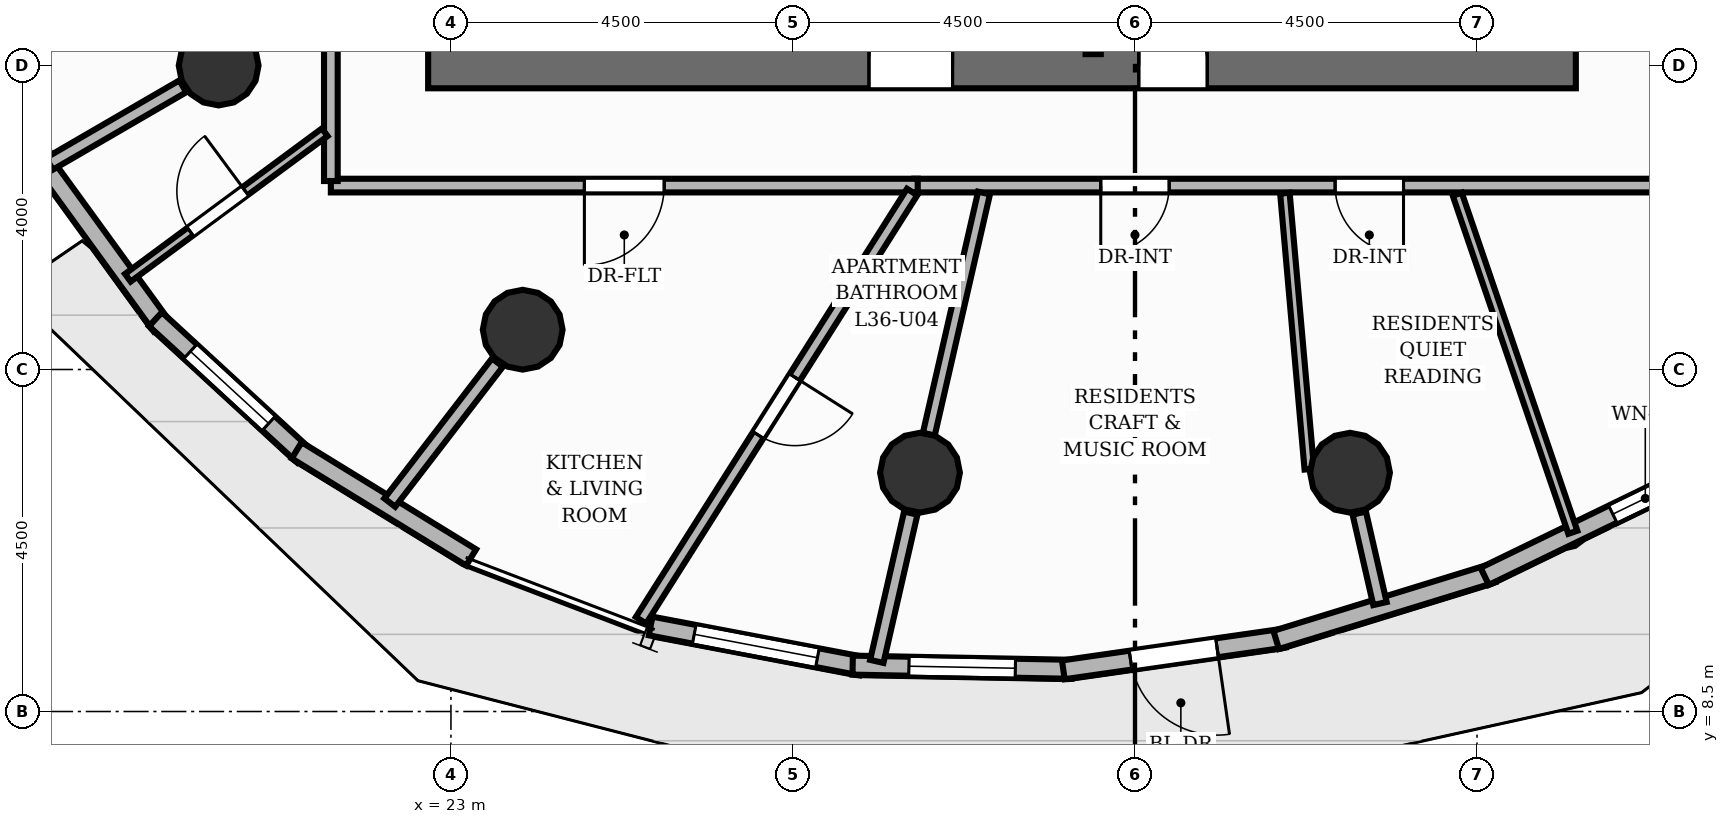
"""IFC4 building model, lengths in metres.
Left out: names, types, materials, properties, quantities, classifications, styles, units other than length and angle.
Written with IfcOpenShell. Run it as: python <this file> out.ifc"""

import sys

from ifc_helpers import new_model, si_unit, direction, frame, frame_2d, origin, origin_2d, place, context, subcontext, project, spatial, rectangle, circle, extrude, element, fill, save


model = new_model("IFC4")
c1 = context("Model", 3, precision=1e-05, world=origin(), true_north=direction((0.0, 1.0)))
c2 = subcontext(c1, "Body", "Model", "MODEL_VIEW")
j1 = project(units=[si_unit("LENGTHUNIT", "METRE"), si_unit("PLANEANGLEUNIT", "RADIAN")], contexts=[c1])
p1 = place(None, origin())
s1 = spatial("IfcSite", under=j1, at=p1, CompositionType="ELEMENT")
p2 = place(p1, origin())
s2 = spatial("IfcBuilding", under=s1, at=p2, CompositionType="ELEMENT")
p3 = place(p2, frame((0.0, 0.0, 123.36)))
s3 = spatial("IfcBuildingStorey", under=s2, at=p3, CompositionType="ELEMENT", Elevation=123.36)
p4 = place(p3, frame((22.7, 17.0, 0.0), z_axis=(0.0, 0.0, 1.0), x_axis=(1.0, 0.0, 0.0)))
e1 = element("IfcWall", 1, at=p4, inside=s3, PredefinedType="SHEAR", context=c2, shape_type="SweptSolid", body=[
    extrude(rectangle(XDim=15.1, YDim=0.6, at=frame_2d((7.55, 0.0))), origin(), (0.0, 0.0, 1.0), 3.2),
])
p5 = place(p4, frame((5.8, 0.0, 0.0)))
e2 = element("IfcOpeningElement", 2, at=p5, cuts=e1, PredefinedType="OPENING", context=c2, shape_type="SweptSolid", body=[
    extrude(rectangle(XDim=1.1, YDim=2.15, at=frame_2d((0.55, 1.075))), frame((0.0, 0.31, 0.0), z_axis=(0.0, -1.0, 0.0), x_axis=(1.0, 0.0, 0.0)), (0.0, 0.0, 1.0), 0.62),
])
p6 = place(p4, frame((9.35, 0.0, 0.0)))
e3 = element("IfcOpeningElement", 3, at=p6, cuts=e1, PredefinedType="OPENING", context=c2, shape_type="SweptSolid", body=[
    extrude(rectangle(XDim=0.9, YDim=2.1, at=frame_2d((0.45, 1.05))), frame((0.0, 0.31, 0.0), z_axis=(0.0, -1.0, 0.0), x_axis=(1.0, 0.0, 0.0)), (0.0, 0.0, 1.0), 0.62),
])
for number, where, z_axis, x_axis in (
    (4, (19.944, 17.0, 0.0), (0.0, 0.0, 1.0), (1.0, 0.0, 0.0)),
    (5, (23.944, 13.523, 0.0), (0.0, 0.0, 1.0), (1.0, 0.0, 0.0)),
    (6, (29.171, 11.642, 0.0), (0.0, 0.0, 1.0), (1.0, 0.0, 0.0)),
    (7, (34.829, 11.642, 0.0), (0.0, 0.0, 1.0), (1.0, 0.0, 0.0)),
):
    element("IfcColumn", number, at=place(p3, frame(where, z_axis=z_axis, x_axis=x_axis)), inside=s3, PredefinedType="COLUMN", context=c2, shape_type="SweptSolid", body=[
        extrude(circle(Radius=0.525, at=origin_2d()), origin(), (0.0, 0.0, 1.0), 3.2),
    ])
p7 = place(p3, frame((17.705, 15.6, 0.0), z_axis=(0.0, 0.0, 1.0), x_axis=(-0.41458087789, 0.910012470073, 0.0)))
e8 = element("IfcWall", 8, at=p7, inside=s3, PredefinedType="SOLIDWALL", context=c2, shape_type="SweptSolid", body=[
    extrude(rectangle(XDim=2.624, YDim=0.25, at=frame_2d((1.312, 0.0))), origin(), (0.0, 0.0, 1.0), 2.96),
])
p8 = place(p7, frame((0.612, 0.0, 0.85)))
e9 = element("IfcOpeningElement", 9, at=p8, cuts=e8, PredefinedType="OPENING", context=c2, shape_type="SweptSolid", body=[
    extrude(rectangle(XDim=1.4, YDim=1.55, at=frame_2d((0.7, 0.775))), frame((0.0, 0.135, 0.0), z_axis=(0.0, -1.0, 0.0), x_axis=(1.0, 0.0, 0.0)), (0.0, 0.0, 1.0), 0.27),
])
p9 = place(p3, frame((19.189, 13.576, 0.0), z_axis=(0.0, 0.0, 1.0), x_axis=(-0.587574137145, 0.80917033643, 0.0)))
e10 = element("IfcWall", 10, at=p9, inside=s3, PredefinedType="SOLIDWALL", context=c2, shape_type="SweptSolid", body=[
    extrude(rectangle(XDim=2.624, YDim=0.25, at=frame_2d((1.312, 0.0))), origin(), (0.0, 0.0, 1.0), 2.96),
])
p10 = place(p3, frame((21.061, 11.868, 0.0), z_axis=(0.0, 0.0, 1.0), x_axis=(-0.73572884951, 0.677276206579, 0.0)))
e11 = element("IfcWall", 11, at=p10, inside=s3, PredefinedType="SOLIDWALL", context=c2, shape_type="SweptSolid", body=[
    extrude(rectangle(XDim=2.648, YDim=0.25, at=frame_2d((1.324, 0.0))), origin(), (0.0, 0.0, 1.0), 2.96),
])
p11 = place(p10, frame((0.624, 0.0, 0.85)))
e12 = element("IfcOpeningElement", 12, at=p11, cuts=e11, PredefinedType="OPENING", context=c2, shape_type="SweptSolid", body=[
    extrude(rectangle(XDim=1.4, YDim=1.55, at=frame_2d((0.7, 0.775))), frame((0.0, 0.135, 0.0), z_axis=(0.0, -1.0, 0.0), x_axis=(1.0, 0.0, 0.0)), (0.0, 0.0, 1.0), 0.27),
])
p12 = place(p3, frame((23.265, 10.527, 0.0), z_axis=(0.0, 0.0, 1.0), x_axis=(-0.852103133134, 0.523373910797, 0.0)))
e13 = element("IfcWall", 13, at=p12, inside=s3, PredefinedType="SOLIDWALL", context=c2, shape_type="SweptSolid", body=[
    extrude(rectangle(XDim=2.693, YDim=0.25, at=frame_2d((1.346, 0.0))), origin(), (0.0, 0.0, 1.0), 2.96),
])
p13 = place(p3, frame((28.396, 9.099, 0.0), z_axis=(0.0, 0.0, 1.0), x_axis=(-0.982412055756, 0.18672587583, 0.0)))
e14 = element("IfcWall", 14, at=p13, inside=s3, PredefinedType="SOLIDWALL", context=c2, shape_type="SweptSolid", body=[
    extrude(rectangle(XDim=2.818, YDim=0.25, at=frame_2d((1.409, 0.0))), origin(), (0.0, 0.0, 1.0), 2.96),
])
p14 = place(p13, frame((0.584, 0.0, 0.85)))
e15 = element("IfcOpeningElement", 15, at=p14, cuts=e14, PredefinedType="OPENING", context=c2, shape_type="SweptSolid", body=[
    extrude(rectangle(XDim=1.65, YDim=1.55, at=frame_2d((0.825, 0.775))), frame((0.0, 0.135, 0.0), z_axis=(0.0, -1.0, 0.0), x_axis=(1.0, 0.0, 0.0)), (0.0, 0.0, 1.0), 0.27),
])
p15 = place(p3, frame((31.167, 9.055, 0.0), z_axis=(0.0, 0.0, 1.0), x_axis=(-0.99981990109, 0.018978023714, 0.0)))
e16 = element("IfcWall", 16, at=p15, inside=s3, PredefinedType="SOLIDWALL", context=c2, shape_type="SweptSolid", body=[
    extrude(rectangle(XDim=2.882, YDim=0.25, at=frame_2d((1.441, 0.0))), origin(), (0.0, 0.0, 1.0), 2.96),
])
p16 = place(p15, frame((0.741, 0.0, 0.85)))
e17 = element("IfcOpeningElement", 17, at=p16, cuts=e16, PredefinedType="OPENING", context=c2, shape_type="SweptSolid", body=[
    extrude(rectangle(XDim=1.4, YDim=1.55, at=frame_2d((0.7, 0.775))), frame((0.0, 0.135, 0.0), z_axis=(0.0, -1.0, 0.0), x_axis=(1.0, 0.0, 0.0)), (0.0, 0.0, 1.0), 0.27),
])
p17 = place(p3, frame((33.964, 9.466, 0.0), z_axis=(0.0, 0.0, 1.0), x_axis=(-0.989856170947, -0.142073082737, 0.0)))
e18 = element("IfcWall", 18, at=p17, inside=s3, PredefinedType="SOLIDWALL", context=c2, shape_type="SweptSolid", body=[
    extrude(rectangle(XDim=2.937, YDim=0.25, at=frame_2d((1.468, 0.0))), origin(), (0.0, 0.0, 1.0), 2.96),
])
p18 = place(p17, frame((0.893, 0.0, 0.0)))
e19 = element("IfcOpeningElement", 19, at=p18, cuts=e18, PredefinedType="OPENING", context=c2, shape_type="SweptSolid", body=[
    extrude(rectangle(XDim=1.15, YDim=2.2, at=frame_2d((0.575, 1.1))), frame((0.0, 0.135, 0.0), z_axis=(0.0, -1.0, 0.0), x_axis=(1.0, 0.0, 0.0)), (0.0, 0.0, 1.0), 0.27),
])
p19 = place(p3, frame((36.702, 10.319, 0.0), z_axis=(0.0, 0.0, 1.0), x_axis=(-0.955653025963, -0.294494981227, 0.0)))
e20 = element("IfcWall", 20, at=p19, inside=s3, PredefinedType="SOLIDWALL", context=c2, shape_type="SweptSolid", body=[
    extrude(rectangle(XDim=2.977, YDim=0.25, at=frame_2d((1.489, 0.0))), origin(), (0.0, 0.0, 1.0), 2.96),
])
p20 = place(p3, frame((39.299, 11.588, 0.0), z_axis=(0.0, 0.0, 1.0), x_axis=(-0.899657133161, -0.436597117206, 0.0)))
e21 = element("IfcWall", 21, at=p20, inside=s3, PredefinedType="SOLIDWALL", context=c2, shape_type="SweptSolid", body=[
    extrude(rectangle(XDim=2.998, YDim=0.25, at=frame_2d((1.499, 0.0))), origin(), (0.0, 0.0, 1.0), 2.96),
])
p21 = place(p20, frame((0.175, 0.0, 0.85)))
e22 = element("IfcOpeningElement", 22, at=p21, cuts=e21, PredefinedType="OPENING", context=c2, shape_type="SweptSolid", body=[
    extrude(rectangle(XDim=0.95, YDim=1.45, at=frame_2d((0.475, 0.725))), frame((0.0, 0.135, 0.0), z_axis=(0.0, -1.0, 0.0), x_axis=(1.0, 0.0, 0.0)), (0.0, 0.0, 1.0), 0.27),
])
p22 = place(p3, frame((31.45, 17.15, 0.0), z_axis=(0.0, 0.0, 1.0), x_axis=(0.0, 1.0, 0.0)))
e23 = element("IfcWall", 23, at=p22, inside=s3, PredefinedType="SHEAR", context=c2, shape_type="SweptSolid", body=[
    extrude(rectangle(XDim=3.5, YDim=0.2, at=frame_2d((1.75, 0.0))), origin(), (0.0, 0.0, 1.0), 3.2),
])
p23 = place(p3, frame((19.472, 16.726, 0.0), z_axis=(0.0, 0.0, 1.0), x_axis=(-0.86481084581, -0.502097800203, 0.0)))
e24 = element("IfcWall", 24, at=p23, inside=s3, PredefinedType="PARTITIONING", context=c2, shape_type="SweptSolid", body=[
    extrude(rectangle(XDim=2.03, YDim=0.18, at=frame_2d((1.015, 0.0))), origin(), (0.0, 0.0, 1.0), 2.336),
])
p24 = place(p3, frame((23.612, 13.092, 0.0), z_axis=(0.0, 0.0, 1.0), x_axis=(-0.609553382458, -0.792745024541, 0.0)))
e25 = element("IfcWall", 25, at=p24, inside=s3, PredefinedType="PARTITIONING", context=c2, shape_type="SweptSolid", body=[
    extrude(rectangle(XDim=2.324, YDim=0.18, at=frame_2d((1.162, 0.0))), origin(), (0.0, 0.0, 1.0), 2.336),
])
p25 = place(p3, frame((29.05, 11.111, 0.0), z_axis=(0.0, 0.0, 1.0), x_axis=(-0.2231492674, -0.974784286116, 0.0)))
e26 = element("IfcWall", 26, at=p25, inside=s3, PredefinedType="PARTITIONING", context=c2, shape_type="SweptSolid", body=[
    extrude(rectangle(XDim=2.002, YDim=0.18, at=frame_2d((1.001, 0.0))), origin(), (0.0, 0.0, 1.0), 2.336),
])
p26 = place(p3, frame((34.95, 11.111, 0.0), z_axis=(0.0, 0.0, 1.0), x_axis=(0.223107064029, -0.974793946422, 0.0)))
e27 = element("IfcWall", 27, at=p26, inside=s3, PredefinedType="PARTITIONING", context=c2, shape_type="SweptSolid", body=[
    extrude(rectangle(XDim=1.221, YDim=0.18, at=frame_2d((0.611, 0.0))), origin(), (0.0, 0.0, 1.0), 2.336),
])
p27 = place(p3, frame((39.02, 15.42, 0.0), z_axis=(0.0, 0.0, 1.0), x_axis=(-1.0, 0.0, 0.0)))
e28 = element("IfcWall", 28, at=p27, inside=s3, PredefinedType="PARTITIONING", context=c2, shape_type="SweptSolid", body=[
    extrude(rectangle(XDim=9.922, YDim=0.18, at=frame_2d((4.961, 0.0))), origin(), (0.0, 0.0, 1.0), 2.955),
])
p28 = place(p27, frame((3.487, 0.0, 0.0)))
e29 = element("IfcOpeningElement", 29, at=p28, cuts=e28, PredefinedType="OPENING", context=c2, shape_type="SweptSolid", body=[
    extrude(rectangle(XDim=0.9, YDim=2.1, at=frame_2d((0.45, 1.05))), frame((0.0, 0.1, 0.0), z_axis=(0.0, -1.0, 0.0), x_axis=(1.0, 0.0, 0.0)), (0.0, 0.0, 1.0), 0.2),
])
p29 = place(p27, frame((6.571, 0.0, 0.0)))
e30 = element("IfcOpeningElement", 30, at=p29, cuts=e28, PredefinedType="OPENING", context=c2, shape_type="SweptSolid", body=[
    extrude(rectangle(XDim=0.9, YDim=2.1, at=frame_2d((0.45, 1.05))), frame((0.0, 0.1, 0.0), z_axis=(0.0, -1.0, 0.0), x_axis=(1.0, 0.0, 0.0)), (0.0, 0.0, 1.0), 0.2),
])
p30 = place(p3, frame((29.141, 15.42, 0.0), z_axis=(0.0, 0.0, 1.0), x_axis=(-1.0, 0.0, 0.0)))
e31 = element("IfcWall", 31, at=p30, inside=s3, PredefinedType="PARTITIONING", context=c2, shape_type="SweptSolid", body=[
    extrude(rectangle(XDim=7.721, YDim=0.18, at=frame_2d((3.861, 0.0))), origin(), (0.0, 0.0, 1.0), 2.955),
])
p31 = place(p30, frame((3.336, 0.0, 0.0)))
e32 = element("IfcOpeningElement", 32, at=p31, cuts=e31, PredefinedType="OPENING", context=c2, shape_type="SweptSolid", body=[
    extrude(rectangle(XDim=1.05, YDim=2.15, at=frame_2d((0.525, 1.075))), frame((0.0, 0.1, 0.0), z_axis=(0.0, -1.0, 0.0), x_axis=(1.0, 0.0, 0.0)), (0.0, 0.0, 1.0), 0.2),
])
p32 = place(p3, frame((21.42, 15.48, 0.0), z_axis=(0.0, 0.0, 1.0), x_axis=(0.0, 1.0, 0.0)))
e33 = element("IfcWall", 33, at=p32, inside=s3, PredefinedType="PARTITIONING", context=c2, shape_type="SweptSolid", body=[
    extrude(rectangle(XDim=6.12, YDim=0.18, at=frame_2d((3.06, 0.0))), origin(), (0.0, 0.0, 1.0), 2.955),
])
p33 = place(p3, frame((37.76, 10.858, 0.0), z_axis=(0.0, 0.0, 1.0), x_axis=(-0.323447862149, 0.946245993635, 0.0)))
e34 = element("IfcWall", 34, at=p33, inside=s3, PredefinedType="PARTITIONING", context=c2, shape_type="SweptSolid", body=[
    extrude(rectangle(XDim=4.701, YDim=0.125, at=frame_2d((2.351, 0.0))), origin(), (0.0, 0.0, 1.0), 2.955),
])
p34 = place(p3, frame((34.293, 11.689, 0.0), z_axis=(0.0, 0.0, 1.0), x_axis=(-0.088065804539, 0.996114659098, 0.0)))
e35 = element("IfcWall", 35, at=p34, inside=s3, PredefinedType="PARTITIONING", context=c2, shape_type="SweptSolid", body=[
    extrude(rectangle(XDim=3.646, YDim=0.125, at=frame_2d((1.823, 0.0))), origin(), (0.0, 0.0, 1.0), 2.336),
])
p35 = place(p3, frame((29.287, 12.149, 0.0), z_axis=(0.0, 0.0, 1.0), x_axis=(0.223166862669, 0.97478025801, 0.0)))
e36 = element("IfcWall", 36, at=p35, inside=s3, PredefinedType="PLUMBINGWALL", context=c2, shape_type="SweptSolid", body=[
    extrude(rectangle(XDim=3.256, YDim=0.16, at=frame_2d((1.628, 0.0))), origin(), (0.0, 0.0, 1.0), 2.336),
])
p36 = place(p3, frame((29.068, 15.335, 0.0), z_axis=(0.0, 0.0, 1.0), x_axis=(-0.534879638081, -0.844928264864, 0.0)))
e37 = element("IfcWall", 37, at=p36, inside=s3, PredefinedType="PLUMBINGWALL", context=c2, shape_type="SweptSolid", body=[
    extrude(rectangle(XDim=6.669, YDim=0.16, at=frame_2d((3.335, 0.0))), origin(), (0.0, 0.0, 1.0), 2.692),
])
p37 = place(p36, frame((2.885, 0.0, 0.0)))
e38 = element("IfcOpeningElement", 38, at=p37, cuts=e37, PredefinedType="OPENING", context=c2, shape_type="SweptSolid", body=[
    extrude(rectangle(XDim=0.9, YDim=2.1, at=frame_2d((0.45, 1.05))), frame((0.0, 0.09, 0.0), z_axis=(0.0, -1.0, 0.0), x_axis=(1.0, 0.0, 0.0)), (0.0, 0.0, 1.0), 0.18),
])
p38 = place(p3, frame((18.749, 14.207, 0.0), z_axis=(0.0, 0.0, 1.0), x_axis=(0.804182442208, 0.594382536456, 0.0)))
e39 = element("IfcWall", 39, at=p38, inside=s3, PredefinedType="PARTITIONING", context=c2, shape_type="SweptSolid", body=[
    extrude(rectangle(XDim=3.221, YDim=0.125, at=frame_2d((1.611, 0.0))), origin(), (0.0, 0.0, 1.0), 2.955),
])
p39 = place(p38, frame((1.021, 0.0, 0.0)))
e40 = element("IfcOpeningElement", 40, at=p39, cuts=e39, PredefinedType="OPENING", context=c2, shape_type="SweptSolid", body=[
    extrude(rectangle(XDim=0.9, YDim=2.1, at=frame_2d((0.45, 1.05))), frame((0.0, 0.073, 0.0), z_axis=(0.0, -1.0, 0.0), x_axis=(1.0, 0.0, 0.0)), (0.0, 0.0, 1.0), 0.145),
])
p40 = place(p18, origin())
e41 = element("IfcDoor", 41, at=p40, inside=s3, OperationType="SINGLE_SWING_LEFT", PredefinedType="DOOR", context=c2, shape_type="SweptSolid", body=[
    extrude(rectangle(XDim=1.15, YDim=2.2, at=frame_2d((0.575, 1.1))), frame((0.0, 0.025, 0.0), z_axis=(0.0, -1.0, 0.0), x_axis=(1.0, 0.0, 0.0)), (0.0, 0.0, 1.0), 0.05),
])
fill(e19, e41)
p41 = place(p11, origin())
e42 = element("IfcWindow", 42, at=p41, inside=s3, PartitioningType="SINGLE_PANEL", PredefinedType="WINDOW", context=c2, shape_type="SweptSolid", body=[
    extrude(rectangle(XDim=1.4, YDim=1.55, at=frame_2d((0.7, 0.775))), frame((0.0, 0.03, 0.0), z_axis=(0.0, -1.0, 0.0), x_axis=(1.0, 0.0, 0.0)), (0.0, 0.0, 1.0), 0.06),
])
fill(e12, e42)
p42 = place(p14, origin())
e43 = element("IfcWindow", 43, at=p42, inside=s3, PartitioningType="SINGLE_PANEL", PredefinedType="WINDOW", context=c2, shape_type="SweptSolid", body=[
    extrude(rectangle(XDim=1.65, YDim=1.55, at=frame_2d((0.825, 0.775))), frame((0.0, 0.03, 0.0), z_axis=(0.0, -1.0, 0.0), x_axis=(1.0, 0.0, 0.0)), (0.0, 0.0, 1.0), 0.06),
])
fill(e15, e43)
p43 = place(p16, origin())
e44 = element("IfcWindow", 44, at=p43, inside=s3, PartitioningType="SINGLE_PANEL", PredefinedType="WINDOW", context=c2, shape_type="SweptSolid", body=[
    extrude(rectangle(XDim=1.4, YDim=1.55, at=frame_2d((0.7, 0.775))), frame((0.0, 0.03, 0.0), z_axis=(0.0, -1.0, 0.0), x_axis=(1.0, 0.0, 0.0)), (0.0, 0.0, 1.0), 0.06),
])
fill(e17, e44)
p44 = place(p21, origin())
e45 = element("IfcWindow", 45, at=p44, inside=s3, PartitioningType="SINGLE_PANEL", PredefinedType="WINDOW", context=c2, shape_type="SweptSolid", body=[
    extrude(rectangle(XDim=0.95, YDim=1.45, at=frame_2d((0.475, 0.725))), frame((0.0, 0.03, 0.0), z_axis=(0.0, -1.0, 0.0), x_axis=(1.0, 0.0, 0.0)), (0.0, 0.0, 1.0), 0.06),
])
fill(e22, e45)
p45 = place(p5, origin())
e46 = element("IfcDoor", 46, at=p45, inside=s3, OperationType="SINGLE_SWING_RIGHT", PredefinedType="DOOR", context=c2, shape_type="SweptSolid", body=[
    extrude(rectangle(XDim=1.1, YDim=2.15, at=frame_2d((0.55, 1.075))), frame((0.0, 0.025, 0.0), z_axis=(0.0, -1.0, 0.0), x_axis=(1.0, 0.0, 0.0)), (0.0, 0.0, 1.0), 0.05),
])
fill(e2, e46)
p46 = place(p6, origin())
e47 = element("IfcDoor", 47, at=p46, inside=s3, OperationType="SINGLE_SWING_LEFT", PredefinedType="DOOR", context=c2, shape_type="SweptSolid", body=[
    extrude(rectangle(XDim=0.9, YDim=2.1, at=frame_2d((0.45, 1.05))), frame((0.0, 0.025, 0.0), z_axis=(0.0, -1.0, 0.0), x_axis=(1.0, 0.0, 0.0)), (0.0, 0.0, 1.0), 0.05),
])
fill(e3, e47)
p47 = place(p28, origin())
e48 = element("IfcDoor", 48, at=p47, inside=s3, OperationType="SINGLE_SWING_LEFT", PredefinedType="DOOR", context=c2, shape_type="SweptSolid", body=[
    extrude(rectangle(XDim=0.9, YDim=2.1, at=frame_2d((0.45, 1.05))), frame((0.0, 0.025, 0.0), z_axis=(0.0, -1.0, 0.0), x_axis=(1.0, 0.0, 0.0)), (0.0, 0.0, 1.0), 0.05),
])
fill(e29, e48)
p48 = place(p29, origin())
e49 = element("IfcDoor", 49, at=p48, inside=s3, OperationType="SINGLE_SWING_RIGHT", PredefinedType="DOOR", context=c2, shape_type="SweptSolid", body=[
    extrude(rectangle(XDim=0.9, YDim=2.1, at=frame_2d((0.45, 1.05))), frame((0.0, 0.025, 0.0), z_axis=(0.0, -1.0, 0.0), x_axis=(1.0, 0.0, 0.0)), (0.0, 0.0, 1.0), 0.05),
])
fill(e30, e49)
p49 = place(p31, origin())
e50 = element("IfcDoor", 50, at=p49, inside=s3, OperationType="SINGLE_SWING_RIGHT", PredefinedType="DOOR", context=c2, shape_type="SweptSolid", body=[
    extrude(rectangle(XDim=1.05, YDim=2.15, at=frame_2d((0.525, 1.075))), frame((0.0, 0.025, 0.0), z_axis=(0.0, -1.0, 0.0), x_axis=(1.0, 0.0, 0.0)), (0.0, 0.0, 1.0), 0.05),
])
fill(e32, e50)
p50 = place(p37, origin())
e51 = element("IfcDoor", 51, at=p50, inside=s3, OperationType="SINGLE_SWING_LEFT", PredefinedType="DOOR", context=c2, shape_type="SweptSolid", body=[
    extrude(rectangle(XDim=0.9, YDim=2.1, at=frame_2d((0.45, 1.05))), frame((0.0, 0.025, 0.0), z_axis=(0.0, -1.0, 0.0), x_axis=(1.0, 0.0, 0.0)), (0.0, 0.0, 1.0), 0.05),
])
fill(e38, e51)
p51 = place(p39, origin())
e52 = element("IfcDoor", 52, at=p51, inside=s3, OperationType="SINGLE_SWING_RIGHT", PredefinedType="DOOR", context=c2, shape_type="SweptSolid", body=[
    extrude(rectangle(XDim=0.9, YDim=2.1, at=frame_2d((0.45, 1.05))), frame((0.0, 0.025, 0.0), z_axis=(0.0, -1.0, 0.0), x_axis=(1.0, 0.0, 0.0)), (0.0, 0.0, 1.0), 0.05),
])
fill(e40, e52)
save(model, sys.argv[1])
